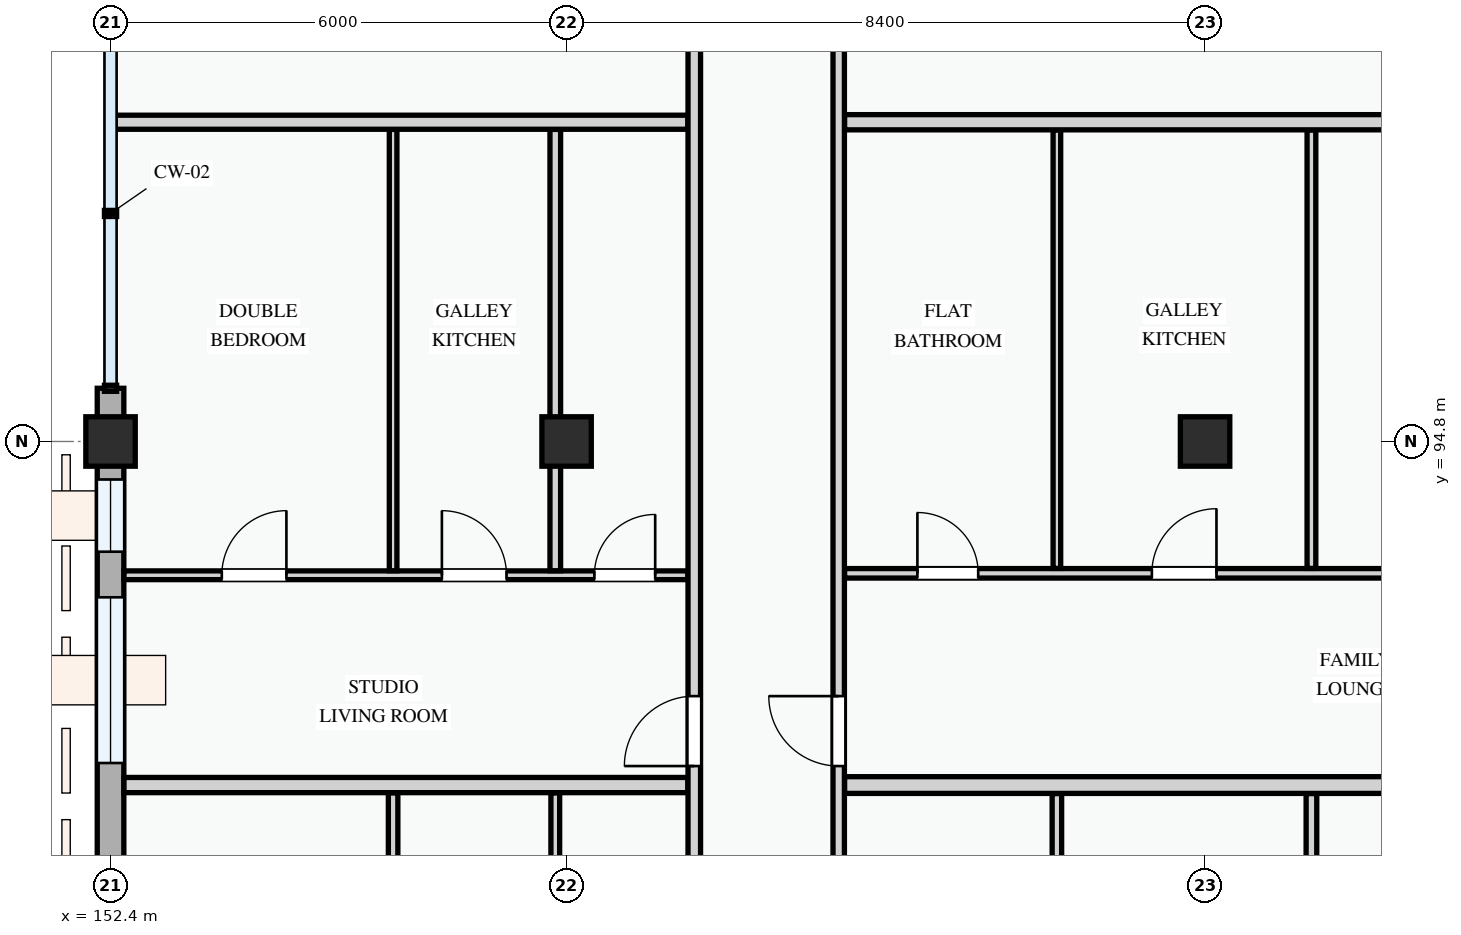
"""IFC4 building model, lengths in metres.
Left out: names, types, materials, properties, quantities, classifications, styles, units other than length and angle.
Written with IfcOpenShell. Run it as: python <this file> out.ifc"""

import sys

from ifc_helpers import new_model, si_unit, direction, frame, frame_2d, origin, origin_2d, place, context, subcontext, project, spatial, rectangle, extrude, element, fill, save


model = new_model("IFC4")
c1 = context("Model", 3, precision=1e-05, world=origin(), true_north=direction((0.0, 1.0)))
c2 = subcontext(c1, "Body", "Model", "MODEL_VIEW")
j1 = project(units=[si_unit("LENGTHUNIT", "METRE"), si_unit("PLANEANGLEUNIT", "RADIAN")], contexts=[c1])
p1 = place(None, origin())
s1 = spatial("IfcSite", under=j1, at=p1, CompositionType="ELEMENT")
p2 = place(p1, origin())
s2 = spatial("IfcBuilding", under=s1, at=p2, CompositionType="ELEMENT")
p3 = place(p2, frame((0.0, 0.0, 11.4)))
s3 = spatial("IfcBuildingStorey", under=s2, at=p3, CompositionType="ELEMENT", Elevation=11.4)
for number, where, z_axis, x_axis in (
    (1, (152.4, 94.8, 0.0), (0.0, 0.0, 1.0), (1.0, 0.0, 0.0)),
    (2, (158.4, 94.8, 0.0), (0.0, 0.0, 1.0), (1.0, 0.0, 0.0)),
    (3, (166.8, 94.8, 0.0), (0.0, 0.0, 1.0), (1.0, 0.0, 0.0)),
):
    element("IfcColumn", number, at=place(p3, frame(where, z_axis=z_axis, x_axis=x_axis)), inside=s3, PredefinedType="COLUMN", context=c2, shape_type="SweptSolid", body=[
        extrude(rectangle(XDim=0.65, YDim=0.65, at=origin_2d()), origin(), (0.0, 0.0, 1.0), 3.3),
    ])
p4 = place(p3, frame((152.4, 95.5, 0.0), z_axis=(0.0, 0.0, 1.0), x_axis=(0.0, -1.0, 0.0)))
e4 = element("IfcWall", 4, at=p4, inside=s3, PredefinedType="STANDARD", context=c2, shape_type="SweptSolid", body=[
    extrude(rectangle(XDim=0.7, YDim=0.35, at=frame_2d((0.35, 0.0))), origin(), (0.0, 0.0, 1.0), 2.575),
])
p5 = place(p3, frame((152.4, 94.8, 0.0), z_axis=(0.0, 0.0, 1.0), x_axis=(0.0, -1.0, 0.0)))
e5 = element("IfcWall", 5, at=p5, inside=s3, PredefinedType="STANDARD", context=c2, shape_type="SweptSolid", body=[
    extrude(rectangle(XDim=8.4, YDim=0.35, at=frame_2d((4.2, 0.0))), origin(), (0.0, 0.0, 1.0), 2.425),
])
p6 = place(p5, frame((0.5, 0.0, 0.78)))
e6 = element("IfcOpeningElement", 6, at=p6, cuts=e5, PredefinedType="OPENING", context=c2, shape_type="SweptSolid", body=[
    extrude(rectangle(XDim=0.95, YDim=1.15, at=frame_2d((0.475, 0.575))), frame((0.0, 0.185, 0.0), z_axis=(0.0, -1.0, 0.0), x_axis=(1.0, 0.0, 0.0)), (0.0, 0.0, 1.0), 0.37),
])
p7 = place(p5, frame((2.05, 0.0, 0.78)))
e7 = element("IfcOpeningElement", 7, at=p7, cuts=e5, PredefinedType="OPENING", context=c2, shape_type="SweptSolid", body=[
    extrude(rectangle(XDim=2.18, YDim=1.48, at=frame_2d((1.09, 0.74))), frame((0.0, 0.185, 0.0), z_axis=(0.0, -1.0, 0.0), x_axis=(1.0, 0.0, 0.0)), (0.0, 0.0, 1.0), 0.37),
])
p8 = place(p5, frame((5.505, 0.0, 0.78)))
e8 = element("IfcOpeningElement", 8, at=p8, cuts=e5, PredefinedType="OPENING", context=c2, shape_type="SweptSolid", body=[
    extrude(rectangle(XDim=1.72, YDim=1.52, at=frame_2d((0.86, 0.76))), frame((0.0, 0.185, 0.0), z_axis=(0.0, -1.0, 0.0), x_axis=(1.0, 0.0, 0.0)), (0.0, 0.0, 1.0), 0.37),
])
p9 = place(p3, frame((156.118, 84.742, 0.0), z_axis=(0.0, 0.0, 1.0), x_axis=(0.0, 1.0, 0.0)))
e9 = element("IfcWall", 9, at=p9, inside=s3, PredefinedType="PARTITIONING", context=c2, shape_type="SweptSolid", body=[
    extrude(rectangle(XDim=5.436, YDim=0.125, at=frame_2d((2.718, 0.0))), origin(), (0.0, 0.0, 1.0), 3.0),
])
p10 = place(p3, frame((158.251, 84.742, 0.0), z_axis=(0.0, 0.0, 1.0), x_axis=(0.0, 1.0, 0.0)))
e10 = element("IfcWall", 10, at=p10, inside=s3, PredefinedType="PARTITIONING", context=c2, shape_type="SweptSolid", body=[
    extrude(rectangle(XDim=5.436, YDim=0.115, at=frame_2d((2.718, 0.0))), origin(), (0.0, 0.0, 1.0), 2.425),
])
p11 = place(p3, frame((168.199, 84.726, 0.0), z_axis=(0.0, 0.0, 1.0), x_axis=(0.0, 1.0, 0.0)))
e11 = element("IfcWall", 11, at=p11, inside=s3, PredefinedType="PARTITIONING", context=c2, shape_type="SweptSolid", body=[
    extrude(rectangle(XDim=5.442, YDim=0.14, at=frame_2d((2.721, 0.0))), origin(), (0.0, 0.0, 1.0), 3.0),
])
p12 = place(p3, frame((164.85, 84.726, 0.0), z_axis=(0.0, 0.0, 1.0), x_axis=(0.0, 1.0, 0.0)))
e12 = element("IfcWall", 12, at=p12, inside=s3, PredefinedType="PARTITIONING", context=c2, shape_type="SweptSolid", body=[
    extrude(rectangle(XDim=5.442, YDim=0.125, at=frame_2d((2.721, 0.0))), origin(), (0.0, 0.0, 1.0), 3.0),
])
p13 = place(p3, frame((152.577, 93.04, 0.0), z_axis=(0.0, 0.0, 1.0), x_axis=(1.0, 0.0, 0.0)))
e13 = element("IfcWall", 13, at=p13, inside=s3, PredefinedType="PARTITIONING", context=c2, shape_type="SweptSolid", body=[
    extrude(rectangle(XDim=7.419, YDim=0.115, at=frame_2d((3.709, 0.0))), origin(), (0.0, 0.0, 1.0), 3.0),
])
p14 = place(p13, frame((1.287, 0.0, 0.0)))
e14 = element("IfcOpeningElement", 14, at=p14, cuts=e13, PredefinedType="OPENING", context=c2, shape_type="SweptSolid", body=[
    extrude(rectangle(XDim=0.85, YDim=2.1, at=frame_2d((0.425, 1.05))), frame((0.0, 0.067, 0.0), z_axis=(0.0, -1.0, 0.0), x_axis=(1.0, 0.0, 0.0)), (0.0, 0.0, 1.0), 0.135),
])
p15 = place(p13, frame((4.182, 0.0, 0.0)))
e15 = element("IfcOpeningElement", 15, at=p15, cuts=e13, PredefinedType="OPENING", context=c2, shape_type="SweptSolid", body=[
    extrude(rectangle(XDim=0.85, YDim=2.1, at=frame_2d((0.425, 1.05))), frame((0.0, 0.067, 0.0), z_axis=(0.0, -1.0, 0.0), x_axis=(1.0, 0.0, 0.0)), (0.0, 0.0, 1.0), 0.135),
])
p16 = place(p13, frame((6.189, 0.0, 0.0)))
e16 = element("IfcOpeningElement", 16, at=p16, cuts=e13, PredefinedType="OPENING", context=c2, shape_type="SweptSolid", body=[
    extrude(rectangle(XDim=0.8, YDim=2.1, at=frame_2d((0.4, 1.05))), frame((0.0, 0.067, 0.0), z_axis=(0.0, -1.0, 0.0), x_axis=(1.0, 0.0, 0.0)), (0.0, 0.0, 1.0), 0.135),
])
p17 = place(p3, frame((156.118, 93.1, 0.0), z_axis=(0.0, 0.0, 1.0), x_axis=(0.0, 1.0, 0.0)))
e17 = element("IfcWall", 17, at=p17, inside=s3, PredefinedType="PARTITIONING", context=c2, shape_type="SweptSolid", body=[
    extrude(rectangle(XDim=5.806, YDim=0.1, at=frame_2d((2.903, 0.0))), origin(), (0.0, 0.0, 1.0), 3.0),
])
p18 = place(p3, frame((158.251, 93.1, 0.0), z_axis=(0.0, 0.0, 1.0), x_axis=(0.0, 1.0, 0.0)))
e18 = element("IfcWall", 18, at=p18, inside=s3, PredefinedType="PARTITIONING", context=c2, shape_type="SweptSolid", body=[
    extrude(rectangle(XDim=5.806, YDim=0.14, at=frame_2d((2.903, 0.0))), origin(), (0.0, 0.0, 1.0), 2.425),
])
p19 = place(p3, frame((162.057, 93.066, 0.0), z_axis=(0.0, 0.0, 1.0), x_axis=(1.0, 0.0, 0.0)))
e19 = element("IfcWall", 19, at=p19, inside=s3, PredefinedType="PARTITIONING", context=c2, shape_type="SweptSolid", body=[
    extrude(rectangle(XDim=11.766, YDim=0.125, at=frame_2d((5.883, 0.0))), origin(), (0.0, 0.0, 1.0), 3.0),
])
p20 = place(p19, frame((0.958, 0.0, 0.0)))
e20 = element("IfcOpeningElement", 20, at=p20, cuts=e19, PredefinedType="OPENING", context=c2, shape_type="SweptSolid", body=[
    extrude(rectangle(XDim=0.8, YDim=2.1, at=frame_2d((0.4, 1.05))), frame((0.0, 0.073, 0.0), z_axis=(0.0, -1.0, 0.0), x_axis=(1.0, 0.0, 0.0)), (0.0, 0.0, 1.0), 0.145),
])
p21 = place(p19, frame((4.043, 0.0, 0.0)))
e21 = element("IfcOpeningElement", 21, at=p21, cuts=e19, PredefinedType="OPENING", context=c2, shape_type="SweptSolid", body=[
    extrude(rectangle(XDim=0.85, YDim=2.1, at=frame_2d((0.425, 1.05))), frame((0.0, 0.073, 0.0), z_axis=(0.0, -1.0, 0.0), x_axis=(1.0, 0.0, 0.0)), (0.0, 0.0, 1.0), 0.145),
])
p22 = place(p19, frame((8.588, 0.0, 0.0)))
e22 = element("IfcOpeningElement", 22, at=p22, cuts=e19, PredefinedType="OPENING", context=c2, shape_type="SweptSolid", body=[
    extrude(rectangle(XDim=0.85, YDim=2.1, at=frame_2d((0.425, 1.05))), frame((0.0, 0.073, 0.0), z_axis=(0.0, -1.0, 0.0), x_axis=(1.0, 0.0, 0.0)), (0.0, 0.0, 1.0), 0.145),
])
p23 = place(p3, frame((168.199, 93.13, 0.0), z_axis=(0.0, 0.0, 1.0), x_axis=(0.0, 1.0, 0.0)))
e23 = element("IfcWall", 23, at=p23, inside=s3, PredefinedType="PARTITIONING", context=c2, shape_type="SweptSolid", body=[
    extrude(rectangle(XDim=5.768, YDim=0.115, at=frame_2d((2.884, 0.0))), origin(), (0.0, 0.0, 1.0), 3.0),
])
p24 = place(p3, frame((164.85, 93.13, 0.0), z_axis=(0.0, 0.0, 1.0), x_axis=(0.0, 1.0, 0.0)))
e24 = element("IfcWall", 24, at=p24, inside=s3, PredefinedType="PARTITIONING", context=c2, shape_type="SweptSolid", body=[
    extrude(rectangle(XDim=5.768, YDim=0.1, at=frame_2d((2.884, 0.0))), origin(), (0.0, 0.0, 1.0), 3.0),
])
p25 = place(p3, frame((152.577, 90.28, 0.0), z_axis=(0.0, 0.0, 1.0), x_axis=(1.0, 0.0, 0.0)))
e25 = element("IfcWall", 25, at=p25, inside=s3, PredefinedType="PARTITIONING", context=c2, shape_type="SweptSolid", body=[
    extrude(rectangle(XDim=7.419, YDim=0.2, at=frame_2d((3.709, 0.0))), origin(), (0.0, 0.0, 1.0), 3.0),
])
p26 = place(p3, frame((162.057, 90.28, 0.0), z_axis=(0.0, 0.0, 1.0), x_axis=(1.0, 0.0, 0.0)))
e26 = element("IfcWall", 26, at=p26, inside=s3, PredefinedType="PARTITIONING", context=c2, shape_type="SweptSolid", body=[
    extrude(rectangle(XDim=11.766, YDim=0.22, at=frame_2d((5.883, 0.0))), origin(), (0.0, 0.0, 1.0), 3.0),
])
p27 = place(p3, frame((152.46, 99.0, 0.0), z_axis=(0.0, 0.0, 1.0), x_axis=(1.0, 0.0, 0.0)))
e27 = element("IfcWall", 27, at=p27, inside=s3, PredefinedType="PARTITIONING", context=c2, shape_type="SweptSolid", body=[
    extrude(rectangle(XDim=7.536, YDim=0.185, at=frame_2d((3.768, 0.0))), origin(), (0.0, 0.0, 1.0), 3.0),
])
p28 = place(p3, frame((162.057, 99.0, 0.0), z_axis=(0.0, 0.0, 1.0), x_axis=(1.0, 0.0, 0.0)))
e28 = element("IfcWall", 28, at=p28, inside=s3, PredefinedType="PARTITIONING", context=c2, shape_type="SweptSolid", body=[
    extrude(rectangle(XDim=11.766, YDim=0.2, at=frame_2d((5.883, 0.0))), origin(), (0.0, 0.0, 1.0), 3.0),
])
p29 = place(p3, frame((160.08, 80.46, 0.0), z_axis=(0.0, 0.0, 1.0), x_axis=(0.0, 1.0, 0.0)))
e29 = element("IfcWall", 29, at=p29, inside=s3, PredefinedType="PARTITIONING", context=c2, shape_type="SweptSolid", body=[
    extrude(rectangle(XDim=28.88, YDim=0.165, at=frame_2d((14.44, 0.0))), origin(), (0.0, 0.0, 1.0), 3.0),
])
p30 = place(p29, frame((2.484, 0.0, 0.0)))
e30 = element("IfcOpeningElement", 30, at=p30, cuts=e29, PredefinedType="OPENING", context=c2, shape_type="SweptSolid", body=[
    extrude(rectangle(XDim=0.92, YDim=2.1, at=frame_2d((0.46, 1.05))), frame((0.0, 0.093, 0.0), z_axis=(0.0, -1.0, 0.0), x_axis=(1.0, 0.0, 0.0)), (0.0, 0.0, 1.0), 0.185),
])
p31 = place(p29, frame((10.07, 0.0, 0.0)))
e31 = element("IfcOpeningElement", 31, at=p31, cuts=e29, PredefinedType="OPENING", context=c2, shape_type="SweptSolid", body=[
    extrude(rectangle(XDim=0.92, YDim=2.1, at=frame_2d((0.46, 1.05))), frame((0.0, 0.093, 0.0), z_axis=(0.0, -1.0, 0.0), x_axis=(1.0, 0.0, 0.0)), (0.0, 0.0, 1.0), 0.185),
])
p32 = place(p29, frame((22.5, 0.0, 0.0)))
e32 = element("IfcOpeningElement", 32, at=p32, cuts=e29, PredefinedType="OPENING", context=c2, shape_type="SweptSolid", body=[
    extrude(rectangle(XDim=0.92, YDim=2.1, at=frame_2d((0.46, 1.05))), frame((0.0, 0.093, 0.0), z_axis=(0.0, -1.0, 0.0), x_axis=(1.0, 0.0, 0.0)), (0.0, 0.0, 1.0), 0.185),
])
p33 = place(p3, frame((161.98, 80.46, 0.0), z_axis=(0.0, 0.0, 1.0), x_axis=(0.0, 1.0, 0.0)))
e33 = element("IfcWall", 33, at=p33, inside=s3, PredefinedType="PARTITIONING", context=c2, shape_type="SweptSolid", body=[
    extrude(rectangle(XDim=28.88, YDim=0.15, at=frame_2d((14.44, 0.0))), origin(), (0.0, 0.0, 1.0), 3.0),
])
p34 = place(p33, frame((2.487, 0.0, 0.0)))
e34 = element("IfcOpeningElement", 34, at=p34, cuts=e33, PredefinedType="OPENING", context=c2, shape_type="SweptSolid", body=[
    extrude(rectangle(XDim=0.96, YDim=2.12, at=frame_2d((0.48, 1.06))), frame((0.0, 0.085, 0.0), z_axis=(0.0, -1.0, 0.0), x_axis=(1.0, 0.0, 0.0)), (0.0, 0.0, 1.0), 0.17),
])
p35 = place(p33, frame((10.07, 0.0, 0.0)))
e35 = element("IfcOpeningElement", 35, at=p35, cuts=e33, PredefinedType="OPENING", context=c2, shape_type="SweptSolid", body=[
    extrude(rectangle(XDim=0.92, YDim=2.1, at=frame_2d((0.46, 1.05))), frame((0.0, 0.085, 0.0), z_axis=(0.0, -1.0, 0.0), x_axis=(1.0, 0.0, 0.0)), (0.0, 0.0, 1.0), 0.17),
])
p36 = place(p33, frame((22.293, 0.0, 0.0)))
e36 = element("IfcOpeningElement", 36, at=p36, cuts=e33, PredefinedType="OPENING", context=c2, shape_type="SweptSolid", body=[
    extrude(rectangle(XDim=0.92, YDim=2.1, at=frame_2d((0.46, 1.05))), frame((0.0, 0.085, 0.0), z_axis=(0.0, -1.0, 0.0), x_axis=(1.0, 0.0, 0.0)), (0.0, 0.0, 1.0), 0.17),
])
p37 = place(p6, origin())
e37 = element("IfcWindow", 37, at=p37, inside=s3, PartitioningType="SINGLE_PANEL", PredefinedType="WINDOW", context=c2, shape_type="SweptSolid", body=[
    extrude(rectangle(XDim=0.95, YDim=1.15, at=frame_2d((0.475, 0.575))), frame((0.0, 0.03, 0.0), z_axis=(0.0, -1.0, 0.0), x_axis=(1.0, 0.0, 0.0)), (0.0, 0.0, 1.0), 0.06),
])
fill(e6, e37)
p38 = place(p7, origin())
e38 = element("IfcWindow", 38, at=p38, inside=s3, PartitioningType="DOUBLE_PANEL_VERTICAL", PredefinedType="WINDOW", context=c2, shape_type="SweptSolid", body=[
    extrude(rectangle(XDim=2.18, YDim=1.48, at=frame_2d((1.09, 0.74))), frame((0.0, 0.03, 0.0), z_axis=(0.0, -1.0, 0.0), x_axis=(1.0, 0.0, 0.0)), (0.0, 0.0, 1.0), 0.06),
])
fill(e7, e38)
p39 = place(p14, origin())
e39 = element("IfcDoor", 39, at=p39, inside=s3, OperationType="SINGLE_SWING_RIGHT", PredefinedType="DOOR", context=c2, shape_type="SweptSolid", body=[
    extrude(rectangle(XDim=0.85, YDim=2.1, at=frame_2d((0.425, 1.05))), frame((0.0, 0.025, 0.0), z_axis=(0.0, -1.0, 0.0), x_axis=(1.0, 0.0, 0.0)), (0.0, 0.0, 1.0), 0.05),
])
fill(e14, e39)
p40 = place(p15, origin())
e40 = element("IfcDoor", 40, at=p40, inside=s3, OperationType="SINGLE_SWING_LEFT", PredefinedType="DOOR", context=c2, shape_type="SweptSolid", body=[
    extrude(rectangle(XDim=0.85, YDim=2.1, at=frame_2d((0.425, 1.05))), frame((0.0, 0.025, 0.0), z_axis=(0.0, -1.0, 0.0), x_axis=(1.0, 0.0, 0.0)), (0.0, 0.0, 1.0), 0.05),
])
fill(e15, e40)
p41 = place(p16, origin())
e41 = element("IfcDoor", 41, at=p41, inside=s3, OperationType="SINGLE_SWING_RIGHT", PredefinedType="DOOR", context=c2, shape_type="SweptSolid", body=[
    extrude(rectangle(XDim=0.8, YDim=2.1, at=frame_2d((0.4, 1.05))), frame((0.0, 0.025, 0.0), z_axis=(0.0, -1.0, 0.0), x_axis=(1.0, 0.0, 0.0)), (0.0, 0.0, 1.0), 0.05),
])
fill(e16, e41)
p42 = place(p20, origin())
e42 = element("IfcDoor", 42, at=p42, inside=s3, OperationType="SINGLE_SWING_LEFT", PredefinedType="DOOR", context=c2, shape_type="SweptSolid", body=[
    extrude(rectangle(XDim=0.8, YDim=2.1, at=frame_2d((0.4, 1.05))), frame((0.0, 0.025, 0.0), z_axis=(0.0, -1.0, 0.0), x_axis=(1.0, 0.0, 0.0)), (0.0, 0.0, 1.0), 0.05),
])
fill(e20, e42)
p43 = place(p21, origin())
e43 = element("IfcDoor", 43, at=p43, inside=s3, OperationType="SINGLE_SWING_RIGHT", PredefinedType="DOOR", context=c2, shape_type="SweptSolid", body=[
    extrude(rectangle(XDim=0.85, YDim=2.1, at=frame_2d((0.425, 1.05))), frame((0.0, 0.025, 0.0), z_axis=(0.0, -1.0, 0.0), x_axis=(1.0, 0.0, 0.0)), (0.0, 0.0, 1.0), 0.05),
])
fill(e21, e43)
p44 = place(p31, origin())
e44 = element("IfcDoor", 44, at=p44, inside=s3, OperationType="SINGLE_SWING_LEFT", PredefinedType="DOOR", context=c2, shape_type="SweptSolid", body=[
    extrude(rectangle(XDim=0.92, YDim=2.1, at=frame_2d((0.46, 1.05))), frame((0.0, 0.025, 0.0), z_axis=(0.0, -1.0, 0.0), x_axis=(1.0, 0.0, 0.0)), (0.0, 0.0, 1.0), 0.05),
])
fill(e31, e44)
p45 = place(p35, origin())
e45 = element("IfcDoor", 45, at=p45, inside=s3, OperationType="SINGLE_SWING_RIGHT", PredefinedType="DOOR", context=c2, shape_type="SweptSolid", body=[
    extrude(rectangle(XDim=0.92, YDim=2.1, at=frame_2d((0.46, 1.05))), frame((0.0, 0.025, 0.0), z_axis=(0.0, -1.0, 0.0), x_axis=(1.0, 0.0, 0.0)), (0.0, 0.0, 1.0), 0.05),
])
fill(e35, e45)
save(model, sys.argv[1])
